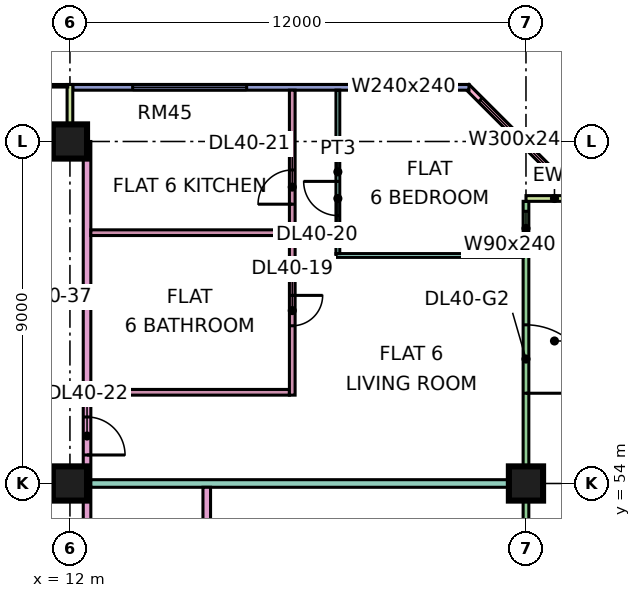
"""IFC4 building model, lengths in metres.
Left out: names, types, materials, properties, quantities, classifications, styles, units other than length and angle.
Written with IfcOpenShell. Run it as: python <this file> out.ifc"""

import sys

from ifc_helpers import new_model, si_unit, direction, frame, frame_2d, origin, origin_2d, place, context, subcontext, project, spatial, rectangle, extrude, element, fill, save


model = new_model("IFC4")
c1 = context("Model", 3, precision=1e-05, world=origin(), true_north=direction((0.0, 1.0)))
c2 = subcontext(c1, "Body", "Model", "MODEL_VIEW")
j1 = project(units=[si_unit("LENGTHUNIT", "METRE"), si_unit("PLANEANGLEUNIT", "RADIAN")], contexts=[c1])
p1 = place(None, origin())
s1 = spatial("IfcSite", under=j1, at=p1, CompositionType="ELEMENT")
p2 = place(p1, origin())
s2 = spatial("IfcBuilding", under=s1, at=p2, CompositionType="ELEMENT")
p3 = place(p2, frame((0.0, 0.0, 176.15)))
s3 = spatial("IfcBuildingStorey", under=s2, at=p3, CompositionType="ELEMENT", Elevation=176.15)
for number, where, z_axis, x_axis in (
    (1, (12.0, 54.0, 0.0), (0.0, 0.0, 1.0), (1.0, 0.0, 0.0)),
    (2, (12.0, 63.0, 0.0), (0.0, 0.0, 1.0), (1.0, 0.0, 0.0)),
    (3, (24.0, 54.0, 0.0), (0.0, 0.0, 1.0), (1.0, 0.0, 0.0)),
):
    element("IfcColumn", number, at=place(p3, frame(where, z_axis=z_axis, x_axis=x_axis)), inside=s3, PredefinedType="COLUMN", context=c2, shape_type="SweptSolid", body=[
        extrude(rectangle(XDim=0.9, YDim=0.9, at=origin_2d()), origin(), (0.0, 0.0, 1.0), 3.75),
    ])
p4 = place(p3, frame((24.0, 48.075, 0.0), z_axis=(0.0, 0.0, 1.0), x_axis=(0.0, 1.0, 0.0)))
e4 = element("IfcWall", 4, at=p4, inside=s3, PredefinedType="SOLIDWALL", context=c2, shape_type="SweptSolid", body=[
    extrude(rectangle(XDim=13.35, YDim=0.15, at=frame_2d((6.675, 0.0))), origin(), (0.0, 0.0, 1.0), 3.35),
])
p5 = place(p4, frame((0.587, 0.0, 0.45)))
e5 = element("IfcOpeningElement", 5, at=p5, cuts=e4, PredefinedType="OPENING", context=c2, shape_type="SweptSolid", body=[
    extrude(rectangle(XDim=4.2, YDim=2.4, at=frame_2d((2.1, 1.2))), frame((0.0, 0.085, 0.0), z_axis=(0.0, -1.0, 0.0), x_axis=(1.0, 0.0, 0.0)), (0.0, 0.0, 1.0), 0.17),
])
p6 = place(p4, frame((8.3, 0.0, 0.0)))
e6 = element("IfcOpeningElement", 6, at=p6, cuts=e4, PredefinedType="OPENING", context=c2, shape_type="SweptSolid", body=[
    extrude(rectangle(XDim=1.8, YDim=2.4, at=frame_2d((0.9, 1.2))), frame((0.0, 0.085, 0.0), z_axis=(0.0, -1.0, 0.0), x_axis=(1.0, 0.0, 0.0)), (0.0, 0.0, 1.0), 0.17),
])
p7 = place(p4, frame((12.188, 0.0, 0.45)))
e7 = element("IfcOpeningElement", 7, at=p7, cuts=e4, PredefinedType="OPENING", context=c2, shape_type="SweptSolid", body=[
    extrude(rectangle(XDim=0.9, YDim=2.4, at=frame_2d((0.45, 1.2))), frame((0.0, 0.085, 0.0), z_axis=(0.0, -1.0, 0.0), x_axis=(1.0, 0.0, 0.0)), (0.0, 0.0, 1.0), 0.17),
])
p8 = place(p3, frame((25.5, 61.5, 0.0), z_axis=(0.0, 0.0, 1.0), x_axis=(-1.0, 0.0, 0.0)))
e8 = element("IfcWall", 8, at=p8, inside=s3, PredefinedType="SOLIDWALL", context=c2, shape_type="SweptSolid", body=[
    extrude(rectangle(XDim=1.5, YDim=0.15, at=frame_2d((0.75, 0.0))), origin(), (0.0, 0.0, 1.0), 3.35),
])
p9 = place(p3, frame((25.447, 61.447, 0.0), z_axis=(0.0, 0.0, 1.0), x_axis=(-0.707106781187, 0.707106781187, 0.0)))
e9 = element("IfcWall", 9, at=p9, inside=s3, PredefinedType="SOLIDWALL", context=c2, shape_type="SweptSolid", body=[
    extrude(rectangle(XDim=4.243, YDim=0.15, at=frame_2d((2.121, 0.0))), origin(), (0.0, 0.0, 1.0), 3.35),
])
p10 = place(p9, frame((0.744, 0.0, 0.45)))
e10 = element("IfcOpeningElement", 10, at=p10, cuts=e9, PredefinedType="OPENING", context=c2, shape_type="SweptSolid", body=[
    extrude(rectangle(XDim=3.0, YDim=2.4, at=frame_2d((1.5, 1.2))), frame((0.0, 0.085, 0.0), z_axis=(0.0, -1.0, 0.0), x_axis=(1.0, 0.0, 0.0)), (0.0, 0.0, 1.0), 0.17),
])
p11 = place(p3, frame((22.5, 64.425, 0.0), z_axis=(0.0, 0.0, 1.0), x_axis=(-1.0, 0.0, 0.0)))
e11 = element("IfcWall", 11, at=p11, inside=s3, PredefinedType="SOLIDWALL", context=c2, shape_type="SweptSolid", body=[
    extrude(rectangle(XDim=10.425, YDim=0.15, at=frame_2d((5.212, 0.0))), origin(), (0.0, 0.0, 1.0), 3.35),
])
p12 = place(p11, frame((0.525, 0.0, 0.45)))
e12 = element("IfcOpeningElement", 12, at=p12, cuts=e11, PredefinedType="OPENING", context=c2, shape_type="SweptSolid", body=[
    extrude(rectangle(XDim=2.4, YDim=2.4, at=frame_2d((1.2, 1.2))), frame((0.0, 0.085, 0.0), z_axis=(0.0, -1.0, 0.0), x_axis=(1.0, 0.0, 0.0)), (0.0, 0.0, 1.0), 0.17),
])
p13 = place(p11, frame((5.85, 0.0, 0.45)))
e13 = element("IfcOpeningElement", 13, at=p13, cuts=e11, PredefinedType="OPENING", context=c2, shape_type="SweptSolid", body=[
    extrude(rectangle(XDim=3.0, YDim=2.4, at=frame_2d((1.5, 1.2))), frame((0.0, 0.085, 0.0), z_axis=(0.0, -1.0, 0.0), x_axis=(1.0, 0.0, 0.0)), (0.0, 0.0, 1.0), 0.17),
])
p14 = place(p3, frame((11.925, 63.0, 0.0), z_axis=(0.0, 0.0, 1.0), x_axis=(-1.0, 0.0, 0.0)))
e14 = element("IfcWall", 14, at=p14, inside=s3, PredefinedType="SOLIDWALL", context=c2, shape_type="SweptSolid", body=[
    extrude(rectangle(XDim=10.35, YDim=0.15, at=frame_2d((5.175, 0.0))), origin(), (0.0, 0.0, 1.0), 3.35),
])
p15 = place(p14, frame((7.688, 0.0, 0.0)))
e15 = element("IfcOpeningElement", 15, at=p15, cuts=e14, PredefinedType="OPENING", context=c2, shape_type="SweptSolid", body=[
    extrude(rectangle(XDim=1.8, YDim=2.4, at=frame_2d((0.9, 1.2))), frame((0.0, 0.085, 0.0), z_axis=(0.0, -1.0, 0.0), x_axis=(1.0, 0.0, 0.0)), (0.0, 0.0, 1.0), 0.17),
])
p16 = place(p3, frame((12.0, 64.5, 0.0), z_axis=(0.0, 0.0, 1.0), x_axis=(0.0, -1.0, 0.0)))
e16 = element("IfcWall", 16, at=p16, inside=s3, PredefinedType="SOLIDWALL", context=c2, shape_type="SweptSolid", body=[
    extrude(rectangle(XDim=1.5, YDim=0.15, at=frame_2d((0.75, 0.0))), origin(), (0.0, 0.0, 1.0), 3.35),
])
p17 = place(p3, frame((12.45, 20.0, 0.0), z_axis=(0.0, 0.0, 1.0), x_axis=(0.0, 1.0, 0.0)))
e17 = element("IfcWall", 17, at=p17, inside=s3, PredefinedType="PARTITIONING", context=c2, shape_type="SweptSolid", body=[
    extrude(rectangle(XDim=43.0, YDim=0.2, at=frame_2d((21.5, 0.0))), origin(), (0.0, 0.0, 1.0), 3.35),
])
p18 = place(p17, frame((5.95, 0.0, 0.0)))
e18 = element("IfcOpeningElement", 18, at=p18, cuts=e17, PredefinedType="OPENING", context=c2, shape_type="SweptSolid", body=[
    extrude(rectangle(XDim=1.0, YDim=2.1, at=frame_2d((0.5, 1.05))), frame((0.0, 0.11, 0.0), z_axis=(0.0, -1.0, 0.0), x_axis=(1.0, 0.0, 0.0)), (0.0, 0.0, 1.0), 0.22),
])
p19 = place(p17, frame((12.0, 0.0, 0.0)))
e19 = element("IfcOpeningElement", 19, at=p19, cuts=e17, PredefinedType="OPENING", context=c2, shape_type="SweptSolid", body=[
    extrude(rectangle(XDim=1.0, YDim=2.1, at=frame_2d((0.5, 1.05))), frame((0.0, 0.11, 0.0), z_axis=(0.0, -1.0, 0.0), x_axis=(1.0, 0.0, 0.0)), (0.0, 0.0, 1.0), 0.22),
])
p20 = place(p17, frame((22.75, 0.0, 0.0)))
e20 = element("IfcOpeningElement", 20, at=p20, cuts=e17, PredefinedType="OPENING", context=c2, shape_type="SweptSolid", body=[
    extrude(rectangle(XDim=1.0, YDim=2.1, at=frame_2d((0.5, 1.05))), frame((0.0, 0.11, 0.0), z_axis=(0.0, -1.0, 0.0), x_axis=(1.0, 0.0, 0.0)), (0.0, 0.0, 1.0), 0.22),
])
p21 = place(p17, frame((34.75, 0.0, 0.0)))
e21 = element("IfcOpeningElement", 21, at=p21, cuts=e17, PredefinedType="OPENING", context=c2, shape_type="SweptSolid", body=[
    extrude(rectangle(XDim=1.0, YDim=2.1, at=frame_2d((0.5, 1.05))), frame((0.0, 0.11, 0.0), z_axis=(0.0, -1.0, 0.0), x_axis=(1.0, 0.0, 0.0)), (0.0, 0.0, 1.0), 0.22),
])
p22 = place(p17, frame((1.15, 0.0, 0.0)))
e22 = element("IfcOpeningElement", 22, at=p22, cuts=e17, PredefinedType="OPENING", context=c2, shape_type="SweptSolid", body=[
    extrude(rectangle(XDim=1.8, YDim=2.1, at=frame_2d((0.9, 1.05))), frame((0.0, 0.11, 0.0), z_axis=(0.0, -1.0, 0.0), x_axis=(1.0, 0.0, 0.0)), (0.0, 0.0, 1.0), 0.22),
])
p23 = place(p17, frame((28.6, 0.0, 0.0)))
e23 = element("IfcOpeningElement", 23, at=p23, cuts=e17, PredefinedType="OPENING", context=c2, shape_type="SweptSolid", body=[
    extrude(rectangle(XDim=1.8, YDim=2.1, at=frame_2d((0.9, 1.05))), frame((0.0, 0.11, 0.0), z_axis=(0.0, -1.0, 0.0), x_axis=(1.0, 0.0, 0.0)), (0.0, 0.0, 1.0), 0.22),
])
p24 = place(p3, frame((12.55, 54.0, 0.0), z_axis=(0.0, 0.0, 1.0), x_axis=(1.0, 0.0, 0.0)))
e24 = element("IfcWall", 24, at=p24, inside=s3, PredefinedType="PARTITIONING", context=c2, shape_type="SweptSolid", body=[
    extrude(rectangle(XDim=11.376, YDim=0.2, at=frame_2d((5.688, 0.0))), origin(), (0.0, 0.0, 1.0), 3.35),
])
for number, where, z_axis, x_axis in (
    (25, (12.55, 56.4, 0.0), (0.0, 0.0, 1.0), (1.0, 0.0, 0.0)),
    (26, (12.55, 60.6, 0.0), (0.0, 0.0, 1.0), (1.0, 0.0, 0.0)),
):
    element("IfcWall", number, at=place(p3, frame(where, z_axis=z_axis, x_axis=x_axis)), inside=s3, PredefinedType="PARTITIONING", context=c2, shape_type="SweptSolid", body=[
        extrude(rectangle(XDim=5.225, YDim=0.15, at=frame_2d((2.612, 0.0))), origin(), (0.0, 0.0, 1.0), 3.35),
    ])
p25 = place(p3, frame((15.6, 51.225, 0.0), z_axis=(0.0, 0.0, 1.0), x_axis=(0.0, 1.0, 0.0)))
e27 = element("IfcWall", 27, at=p25, inside=s3, PredefinedType="PARTITIONING", context=c2, shape_type="SweptSolid", body=[
    extrude(rectangle(XDim=2.675, YDim=0.2, at=frame_2d((1.337, 0.0))), origin(), (0.0, 0.0, 1.0), 3.35),
])
p26 = place(p3, frame((17.85, 56.325, 0.0), z_axis=(0.0, 0.0, 1.0), x_axis=(0.0, 1.0, 0.0)))
e28 = element("IfcWall", 28, at=p26, inside=s3, PredefinedType="PARTITIONING", context=c2, shape_type="SweptSolid", body=[
    extrude(rectangle(XDim=8.025, YDim=0.15, at=frame_2d((4.013, 0.0))), origin(), (0.0, 0.0, 1.0), 3.35),
])
p27 = place(p26, frame((1.825, 0.0, 0.0)))
e29 = element("IfcOpeningElement", 29, at=p27, cuts=e28, PredefinedType="OPENING", context=c2, shape_type="SweptSolid", body=[
    extrude(rectangle(XDim=0.8, YDim=2.1, at=frame_2d((0.4, 1.05))), frame((0.0, 0.085, 0.0), z_axis=(0.0, -1.0, 0.0), x_axis=(1.0, 0.0, 0.0)), (0.0, 0.0, 1.0), 0.17),
])
p28 = place(p26, frame((5.025, 0.0, 0.0)))
e30 = element("IfcOpeningElement", 30, at=p28, cuts=e28, PredefinedType="OPENING", context=c2, shape_type="SweptSolid", body=[
    extrude(rectangle(XDim=0.9, YDim=2.1, at=frame_2d((0.45, 1.05))), frame((0.0, 0.085, 0.0), z_axis=(0.0, -1.0, 0.0), x_axis=(1.0, 0.0, 0.0)), (0.0, 0.0, 1.0), 0.17),
])
p29 = place(p3, frame((19.0, 60.0, 0.0), z_axis=(0.0, 0.0, 1.0), x_axis=(1.0, 0.0, 0.0)))
e31 = element("IfcWall", 31, at=p29, inside=s3, PredefinedType="PARTITIONING", context=c2, shape_type="SweptSolid", body=[
    extrude(rectangle(XDim=4.926, YDim=0.1, at=frame_2d((2.463, 0.0))), origin(), (0.0, 0.0, 1.0), 3.35),
])
p30 = place(p3, frame((19.05, 60.05, 0.0), z_axis=(0.0, 0.0, 1.0), x_axis=(0.0, 1.0, 0.0)))
e32 = element("IfcWall", 32, at=p30, inside=s3, PredefinedType="PARTITIONING", context=c2, shape_type="SweptSolid", body=[
    extrude(rectangle(XDim=4.301, YDim=0.1, at=frame_2d((2.15, 0.0))), origin(), (0.0, 0.0, 1.0), 3.35),
])
p31 = place(p30, frame((1.0, 0.0, 0.0)))
e33 = element("IfcOpeningElement", 33, at=p31, cuts=e32, PredefinedType="OPENING", context=c2, shape_type="SweptSolid", body=[
    extrude(rectangle(XDim=0.9, YDim=2.1, at=frame_2d((0.45, 1.05))), frame((0.0, 0.06, 0.0), z_axis=(0.0, -1.0, 0.0), x_axis=(1.0, 0.0, 0.0)), (0.0, 0.0, 1.0), 0.12),
])
p32 = place(p6, frame((1.8, 0.0, 0.0), z_axis=(0.0, 0.0, 1.0), x_axis=(-1.0, 0.0, 0.0)))
e34 = element("IfcDoor", 34, at=p32, inside=s3, OperationType="DOUBLE_DOOR_SINGLE_SWING", PredefinedType="DOOR", context=c2, shape_type="SweptSolid", body=[
    extrude(rectangle(XDim=1.8, YDim=2.4, at=frame_2d((0.9, 1.2))), frame((0.0, 0.025, 0.0), z_axis=(0.0, -1.0, 0.0), x_axis=(1.0, 0.0, 0.0)), (0.0, 0.0, 1.0), 0.05),
])
fill(e6, e34)
p33 = place(p7, origin())
e35 = element("IfcWindow", 35, at=p33, inside=s3, PartitioningType="SINGLE_PANEL", PredefinedType="WINDOW", context=c2, shape_type="SweptSolid", body=[
    extrude(rectangle(XDim=0.9, YDim=2.4, at=frame_2d((0.45, 1.2))), frame((0.0, 0.03, 0.0), z_axis=(0.0, -1.0, 0.0), x_axis=(1.0, 0.0, 0.0)), (0.0, 0.0, 1.0), 0.06),
])
fill(e7, e35)
p34 = place(p10, origin())
e36 = element("IfcWindow", 36, at=p34, inside=s3, PartitioningType="SINGLE_PANEL", PredefinedType="WINDOW", context=c2, shape_type="SweptSolid", body=[
    extrude(rectangle(XDim=3.0, YDim=2.4, at=frame_2d((1.5, 1.2))), frame((0.0, 0.03, 0.0), z_axis=(0.0, -1.0, 0.0), x_axis=(1.0, 0.0, 0.0)), (0.0, 0.0, 1.0), 0.06),
])
fill(e10, e36)
p35 = place(p12, origin())
e37 = element("IfcWindow", 37, at=p35, inside=s3, PartitioningType="SINGLE_PANEL", PredefinedType="WINDOW", context=c2, shape_type="SweptSolid", body=[
    extrude(rectangle(XDim=2.4, YDim=2.4, at=frame_2d((1.2, 1.2))), frame((0.0, 0.03, 0.0), z_axis=(0.0, -1.0, 0.0), x_axis=(1.0, 0.0, 0.0)), (0.0, 0.0, 1.0), 0.06),
])
fill(e12, e37)
p36 = place(p13, origin())
e38 = element("IfcWindow", 38, at=p36, inside=s3, PartitioningType="SINGLE_PANEL", PredefinedType="WINDOW", context=c2, shape_type="SweptSolid", body=[
    extrude(rectangle(XDim=3.0, YDim=2.4, at=frame_2d((1.5, 1.2))), frame((0.0, 0.03, 0.0), z_axis=(0.0, -1.0, 0.0), x_axis=(1.0, 0.0, 0.0)), (0.0, 0.0, 1.0), 0.06),
])
fill(e13, e38)
p37 = place(p27, origin())
e39 = element("IfcDoor", 39, at=p37, inside=s3, OperationType="SINGLE_SWING_RIGHT", PredefinedType="DOOR", context=c2, shape_type="SweptSolid", body=[
    extrude(rectangle(XDim=0.8, YDim=2.1, at=frame_2d((0.4, 1.05))), frame((0.0, 0.025, 0.0), z_axis=(0.0, -1.0, 0.0), x_axis=(1.0, 0.0, 0.0)), (0.0, 0.0, 1.0), 0.05),
])
fill(e29, e39)
p38 = place(p31, frame((0.9, 0.0, 0.0), z_axis=(0.0, 0.0, 1.0), x_axis=(-1.0, 0.0, 0.0)))
e40 = element("IfcDoor", 40, at=p38, inside=s3, OperationType="SINGLE_SWING_RIGHT", PredefinedType="DOOR", context=c2, shape_type="SweptSolid", body=[
    extrude(rectangle(XDim=0.9, YDim=2.1, at=frame_2d((0.45, 1.05))), frame((0.0, 0.025, 0.0), z_axis=(0.0, -1.0, 0.0), x_axis=(1.0, 0.0, 0.0)), (0.0, 0.0, 1.0), 0.05),
])
fill(e33, e40)
p39 = place(p28, origin())
e41 = element("IfcDoor", 41, at=p39, inside=s3, OperationType="SINGLE_SWING_LEFT", PredefinedType="DOOR", context=c2, shape_type="SweptSolid", body=[
    extrude(rectangle(XDim=0.9, YDim=2.1, at=frame_2d((0.45, 1.05))), frame((0.0, 0.025, 0.0), z_axis=(0.0, -1.0, 0.0), x_axis=(1.0, 0.0, 0.0)), (0.0, 0.0, 1.0), 0.05),
])
fill(e30, e41)
p40 = place(p21, frame((1.0, 0.0, 0.0), z_axis=(0.0, 0.0, 1.0), x_axis=(-1.0, 0.0, 0.0)))
e42 = element("IfcDoor", 42, at=p40, inside=s3, OperationType="SINGLE_SWING_LEFT", PredefinedType="DOOR", context=c2, shape_type="SweptSolid", body=[
    extrude(rectangle(XDim=1.0, YDim=2.1, at=frame_2d((0.5, 1.05))), frame((0.0, 0.025, 0.0), z_axis=(0.0, -1.0, 0.0), x_axis=(1.0, 0.0, 0.0)), (0.0, 0.0, 1.0), 0.05),
])
fill(e21, e42)
save(model, sys.argv[1])
